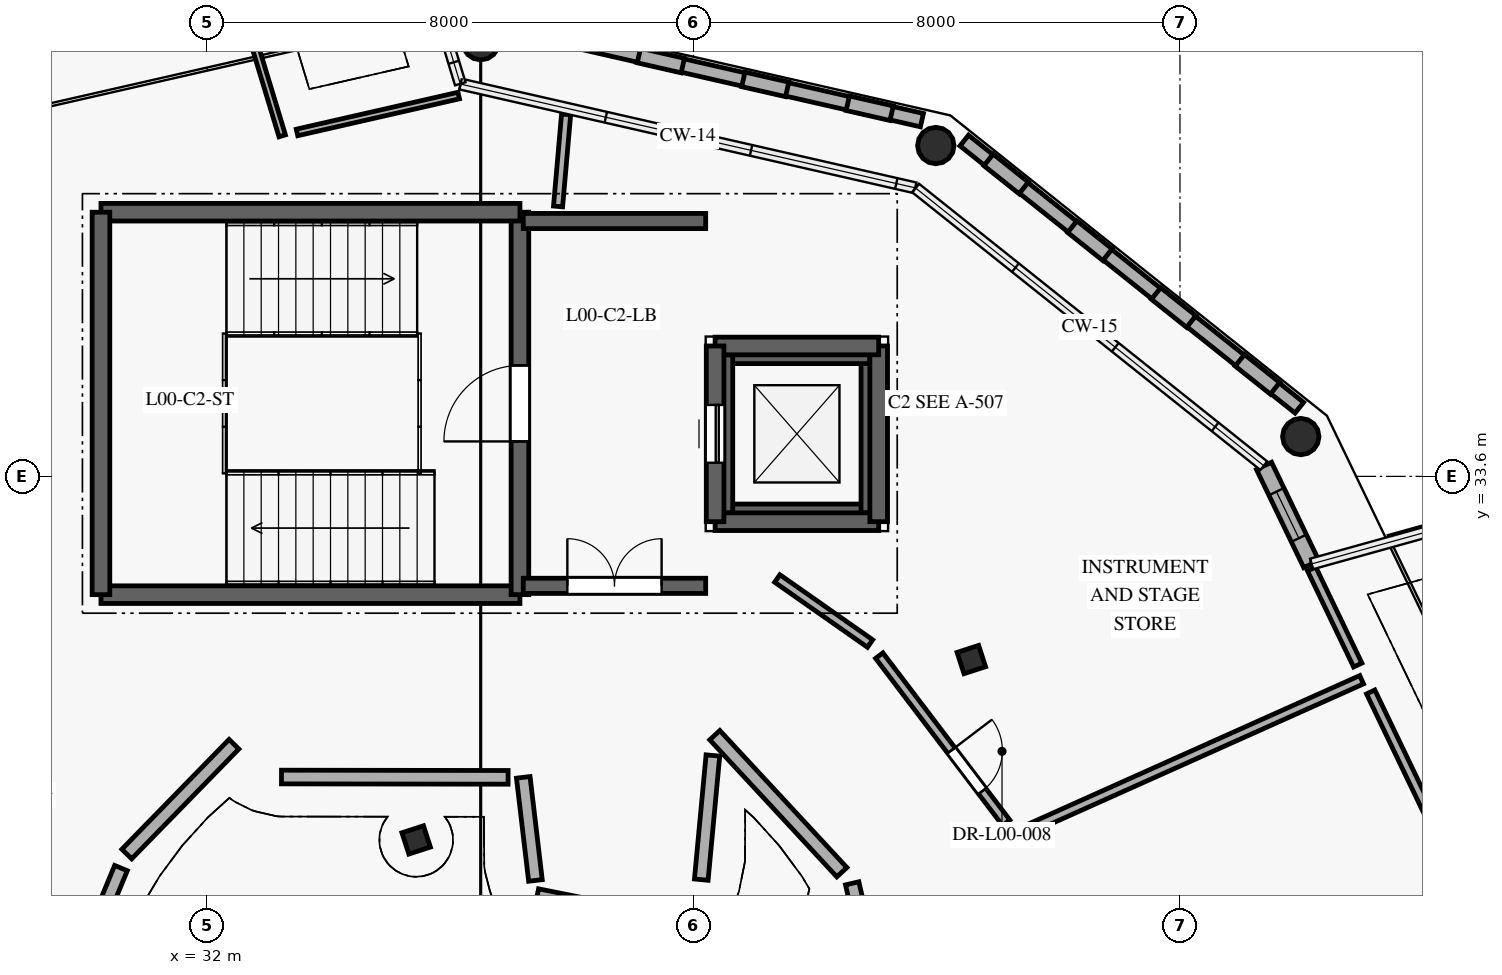
"""IFC4 building model, lengths in metres.
Left out: names, types, materials, properties, quantities, classifications, styles, units other than length and angle.
Written with IfcOpenShell. Run it as: python <this file> out.ifc"""

import sys

from ifc_helpers import new_model, si_unit, direction, frame, frame_2d, origin, origin_2d, place, context, subcontext, project, spatial, rectangle, circle, i_section, extrude, element, fill, save


model = new_model("IFC4")
c1 = context("Model", 3, precision=1e-05, world=origin(), true_north=direction((0.0, 1.0)))
c2 = subcontext(c1, "Body", "Model", "MODEL_VIEW")
j1 = project(units=[si_unit("LENGTHUNIT", "METRE"), si_unit("PLANEANGLEUNIT", "RADIAN")], contexts=[c1])
p1 = place(None, origin())
s1 = spatial("IfcSite", under=j1, at=p1, CompositionType="ELEMENT")
p2 = place(p1, origin())
s2 = spatial("IfcBuilding", under=s1, at=p2, CompositionType="ELEMENT")
p3 = place(p2, origin())
s3 = spatial("IfcBuildingStorey", under=s2, at=p3, CompositionType="ELEMENT", Elevation=0.0)
for number, where, z_axis, x_axis in (
    (1, (35.439, 27.621, 0.0), (0.0, 0.0, 1.0), (0.951, 0.309, 0.0)),
    (2, (44.569, 30.588, 0.0), (0.0, 0.0, 1.0), (0.951, 0.309, 0.0)),
):
    element("IfcColumn", number, at=place(p3, frame(where, z_axis=z_axis, x_axis=x_axis)), inside=s3, PredefinedType="COLUMN", context=c2, shape_type="SweptSolid", body=[
        extrude(i_section(OverallWidth=0.373, OverallDepth=0.368, WebThickness=0.014, FlangeThickness=0.024, FilletRadius=0.015, at=origin_2d()), origin(), (0.0, 0.0, 1.0), 4.2),
    ])
for number, where, z_axis, x_axis in (
    (3, (49.987, 34.255, 0.0), (0.0, 0.0, 1.0), (-0.623, 0.782, 0.0)),
    (4, (43.985, 39.042, 0.0), (0.0, 0.0, 1.0), (-0.901, 0.434, 0.0)),
    (5, (36.5, 40.75, 0.0), (0.0, 0.0, 1.0), (-1.0, 0.0, 0.0)),
):
    element("IfcColumn", number, at=place(p3, frame(where, z_axis=z_axis, x_axis=x_axis)), inside=s3, PredefinedType="COLUMN", context=c2, shape_type="SweptSolid", body=[
        extrude(circle(Radius=0.3, at=origin_2d()), origin(), (0.0, 0.0, 1.0), 4.2),
    ])
p4 = place(p3, frame((49.382, 33.773, 0.0), z_axis=(0.0, 0.0, 1.0), x_axis=(0.433922119058, -0.90095038409, 0.0)))
e6 = element("IfcWall", 6, at=p4, inside=s3, PredefinedType="SOLIDWALL", context=c2, shape_type="SweptSolid", body=[
    extrude(rectangle(XDim=1.792, YDim=0.275, at=frame_2d((0.896, 0.0))), origin(), (0.0, 0.0, 1.0), 3.94),
])
p5 = place(p4, frame((0.471, 0.0, 0.85)))
e7 = element("IfcOpeningElement", 7, at=p5, cuts=e6, PredefinedType="OPENING", context=c2, shape_type="SweptSolid", body=[
    extrude(rectangle(XDim=0.85, YDim=1.4, at=frame_2d((0.425, 0.7))), frame((0.0, 0.147, 0.0), z_axis=(0.0, -1.0, 0.0), x_axis=(1.0, 0.0, 0.0)), (0.0, 0.0, 1.0), 0.295),
])
p6 = place(p3, frame((49.963, 34.73, 0.0), z_axis=(0.0, 0.0, 1.0), x_axis=(-0.781827630302, 0.623494632291, 0.0)))
e8 = element("IfcWall", 8, at=p6, inside=s3, PredefinedType="ELEMENTEDWALL", context=c2, shape_type="SweptSolid", body=[
    extrude(rectangle(XDim=7.048, YDim=0.225, at=frame_2d((3.524, 0.0))), origin(), (0.0, 0.0, 1.0), 0.55),
])
for number, where, z_axis, x_axis in (
    (9, (49.563, 35.048, 0.55), (0.0, 0.0, 1.0), (-0.782, 0.623, 0.0)),
    (10, (48.186, 36.147, 0.55), (0.0, 0.0, 1.0), (-0.782, 0.623, 0.0)),
    (11, (46.808, 37.246, 0.55), (0.0, 0.0, 1.0), (-0.782, 0.623, 0.0)),
    (12, (45.431, 38.344, 0.55), (0.0, 0.0, 1.0), (-0.782, 0.623, 0.0)),
):
    element("IfcWall", number, at=place(p3, frame(where, z_axis=z_axis, x_axis=x_axis)), inside=s3, PredefinedType="ELEMENTEDWALL", context=c2, shape_type="SweptSolid", body=[
        extrude(rectangle(XDim=0.74, YDim=0.245, at=frame_2d((0.37, 0.0))), origin(), (0.0, 0.0, 1.0), 3.39),
    ])
p7 = place(p3, frame((43.756, 39.459, 0.0), z_axis=(0.0, 0.0, 1.0), x_axis=(-0.974930278984, 0.222510564064, 0.0)))
e13 = element("IfcWall", 13, at=p7, inside=s3, PredefinedType="ELEMENTEDWALL", context=c2, shape_type="SweptSolid", body=[
    extrude(rectangle(XDim=7.046, YDim=0.225, at=frame_2d((3.523, 0.0))), origin(), (0.0, 0.0, 1.0), 0.55),
])
p8 = place(p3, frame((43.258, 39.573, 0.55), z_axis=(0.0, 0.0, 1.0), x_axis=(-0.974960788757, 0.222376843189, 0.0)))
e14 = element("IfcWall", 14, at=p8, inside=s3, PredefinedType="ELEMENTEDWALL", context=c2, shape_type="SweptSolid", body=[
    extrude(rectangle(XDim=0.74, YDim=0.245, at=frame_2d((0.37, 0.0))), origin(), (0.0, 0.0, 1.0), 3.39),
])
p9 = place(p3, frame((41.541, 39.965, 0.55), z_axis=(0.0, 0.0, 1.0), x_axis=(-0.974977096703, 0.222305332604, 0.0)))
e15 = element("IfcWall", 15, at=p9, inside=s3, PredefinedType="ELEMENTEDWALL", context=c2, shape_type="SweptSolid", body=[
    extrude(rectangle(XDim=0.74, YDim=0.245, at=frame_2d((0.37, 0.0))), origin(), (0.0, 0.0, 1.0), 3.39),
])
p10 = place(p3, frame((39.823, 40.357, 0.55), z_axis=(0.0, 0.0, 1.0), x_axis=(-0.974960788757, 0.222376843189, 0.0)))
e16 = element("IfcWall", 16, at=p10, inside=s3, PredefinedType="ELEMENTEDWALL", context=c2, shape_type="SweptSolid", body=[
    extrude(rectangle(XDim=0.74, YDim=0.245, at=frame_2d((0.37, 0.0))), origin(), (0.0, 0.0, 1.0), 3.39),
])
p11 = place(p3, frame((40.5, 33.0, -1.4), z_axis=(0.0, 0.0, 1.0), x_axis=(1.0, 0.0, 0.0)))
e17 = element("IfcWall", 17, at=p11, inside=s3, PredefinedType="SHEAR", context=c2, shape_type="SweptSolid", body=[
    extrude(rectangle(XDim=2.4, YDim=0.29, at=frame_2d((1.2, 0.0))), origin(), (0.0, 0.0, 1.0), 1.4),
])
p12 = place(p3, frame((42.9, 33.0, -1.4), z_axis=(0.0, 0.0, 1.0), x_axis=(0.0, 1.0, 0.0)))
e18 = element("IfcWall", 18, at=p12, inside=s3, PredefinedType="SHEAR", context=c2, shape_type="SweptSolid", body=[
    extrude(rectangle(XDim=2.6, YDim=0.29, at=frame_2d((1.3, 0.0))), origin(), (0.0, 0.0, 1.0), 1.4),
])
p13 = place(p3, frame((42.9, 35.6, -1.4), z_axis=(0.0, 0.0, 1.0), x_axis=(-1.0, 0.0, 0.0)))
e19 = element("IfcWall", 19, at=p13, inside=s3, PredefinedType="SHEAR", context=c2, shape_type="SweptSolid", body=[
    extrude(rectangle(XDim=2.4, YDim=0.29, at=frame_2d((1.2, 0.0))), origin(), (0.0, 0.0, 1.0), 1.4),
])
p14 = place(p3, frame((40.5, 35.6, -1.4), z_axis=(0.0, 0.0, 1.0), x_axis=(0.0, -1.0, 0.0)))
e20 = element("IfcWall", 20, at=p14, inside=s3, PredefinedType="SHEAR", context=c2, shape_type="SweptSolid", body=[
    extrude(rectangle(XDim=2.6, YDim=0.29, at=frame_2d((1.3, 0.0))), origin(), (0.0, 0.0, 1.0), 1.4),
])
p15 = place(p3, frame((30.255, 31.655, 0.0), z_axis=(0.0, 0.0, 1.0), x_axis=(1.0, 0.0, 0.0)))
e21 = element("IfcWall", 21, at=p15, inside=s3, PredefinedType="SHEAR", context=c2, shape_type="SweptSolid", body=[
    extrude(rectangle(XDim=6.89, YDim=0.29, at=frame_2d((3.445, 0.0))), origin(), (0.0, 0.0, 1.0), 3.95),
])
p16 = place(p3, frame((37.145, 31.655, 0.0), z_axis=(0.0, 0.0, 1.0), x_axis=(0.0, 1.0, 0.0)))
e22 = element("IfcWall", 22, at=p16, inside=s3, PredefinedType="SHEAR", context=c2, shape_type="SweptSolid", body=[
    extrude(rectangle(XDim=6.29, YDim=0.29, at=frame_2d((3.145, 0.0))), origin(), (0.0, 0.0, 1.0), 3.95),
])
p17 = place(p16, frame((2.52, 0.0, 0.0)))
e23 = element("IfcOpeningElement", 23, at=p17, cuts=e22, PredefinedType="OPENING", context=c2, shape_type="SweptSolid", body=[
    extrude(rectangle(XDim=1.25, YDim=2.1, at=frame_2d((0.625, 1.05))), frame((0.0, 0.155, 0.0), z_axis=(0.0, -1.0, 0.0), x_axis=(1.0, 0.0, 0.0)), (0.0, 0.0, 1.0), 0.31),
])
p18 = place(p3, frame((37.145, 37.945, 0.0), z_axis=(0.0, 0.0, 1.0), x_axis=(-1.0, 0.0, 0.0)))
e24 = element("IfcWall", 24, at=p18, inside=s3, PredefinedType="SHEAR", context=c2, shape_type="SweptSolid", body=[
    extrude(rectangle(XDim=6.89, YDim=0.29, at=frame_2d((3.445, 0.0))), origin(), (0.0, 0.0, 1.0), 3.95),
])
p19 = place(p3, frame((30.255, 37.945, 0.0), z_axis=(0.0, 0.0, 1.0), x_axis=(0.0, -1.0, 0.0)))
e25 = element("IfcWall", 25, at=p19, inside=s3, PredefinedType="SHEAR", context=c2, shape_type="SweptSolid", body=[
    extrude(rectangle(XDim=6.29, YDim=0.29, at=frame_2d((3.145, 0.0))), origin(), (0.0, 0.0, 1.0), 3.95),
])
p20 = place(p3, frame((40.355, 32.855, 0.0), z_axis=(0.0, 0.0, 1.0), x_axis=(1.0, 0.0, 0.0)))
e26 = element("IfcWall", 26, at=p20, inside=s3, PredefinedType="SHEAR", context=c2, shape_type="SweptSolid", body=[
    extrude(rectangle(XDim=2.69, YDim=0.29, at=frame_2d((1.345, 0.0))), origin(), (0.0, 0.0, 1.0), 3.95),
])
p21 = place(p3, frame((43.045, 32.855, 0.0), z_axis=(0.0, 0.0, 1.0), x_axis=(0.0, 1.0, 0.0)))
e27 = element("IfcWall", 27, at=p21, inside=s3, PredefinedType="SHEAR", context=c2, shape_type="SweptSolid", body=[
    extrude(rectangle(XDim=2.89, YDim=0.29, at=frame_2d((1.445, 0.0))), origin(), (0.0, 0.0, 1.0), 3.95),
])
p22 = place(p3, frame((43.045, 35.745, 0.0), z_axis=(0.0, 0.0, 1.0), x_axis=(-1.0, 0.0, 0.0)))
e28 = element("IfcWall", 28, at=p22, inside=s3, PredefinedType="SHEAR", context=c2, shape_type="SweptSolid", body=[
    extrude(rectangle(XDim=2.69, YDim=0.29, at=frame_2d((1.345, 0.0))), origin(), (0.0, 0.0, 1.0), 3.95),
])
p23 = place(p3, frame((40.355, 35.745, 0.0), z_axis=(0.0, 0.0, 1.0), x_axis=(0.0, -1.0, 0.0)))
e29 = element("IfcWall", 29, at=p23, inside=s3, PredefinedType="SHEAR", context=c2, shape_type="SweptSolid", body=[
    extrude(rectangle(XDim=2.89, YDim=0.29, at=frame_2d((1.445, 0.0))), origin(), (0.0, 0.0, 1.0), 3.95),
])
p24 = place(p23, frame((0.97, 0.0, 0.0)))
e30 = element("IfcOpeningElement", 30, at=p24, cuts=e29, PredefinedType="OPENING", context=c2, shape_type="SweptSolid", body=[
    extrude(rectangle(XDim=0.95, YDim=2.1, at=frame_2d((0.475, 1.05))), frame((0.0, 0.155, 0.0), z_axis=(0.0, -1.0, 0.0), x_axis=(1.0, 0.0, 0.0)), (0.0, 0.0, 1.0), 0.31),
])
p25 = place(p3, frame((37.2, 31.8, 0.0), z_axis=(0.0, 0.0, 1.0), x_axis=(1.0, 0.0, 0.0)))
e31 = element("IfcWall", 31, at=p25, inside=s3, PredefinedType="SHEAR", context=c2, shape_type="SweptSolid", body=[
    extrude(rectangle(XDim=3.0, YDim=0.25, at=frame_2d((1.5, 0.0))), origin(), (0.0, 0.0, 1.0), 3.95),
])
p26 = place(p25, frame((0.725, 0.0, 0.0)))
e32 = element("IfcOpeningElement", 32, at=p26, cuts=e31, PredefinedType="OPENING", context=c2, shape_type="SweptSolid", body=[
    extrude(rectangle(XDim=1.55, YDim=2.15, at=frame_2d((0.775, 1.075))), frame((0.0, 0.135, 0.0), z_axis=(0.0, -1.0, 0.0), x_axis=(1.0, 0.0, 0.0)), (0.0, 0.0, 1.0), 0.27),
])
p27 = place(p3, frame((40.2, 37.8, 0.0), z_axis=(0.0, 0.0, 1.0), x_axis=(-1.0, 0.0, 0.0)))
e33 = element("IfcWall", 33, at=p27, inside=s3, PredefinedType="SHEAR", context=c2, shape_type="SweptSolid", body=[
    extrude(rectangle(XDim=3.0, YDim=0.25, at=frame_2d((1.5, 0.0))), origin(), (0.0, 0.0, 1.0), 3.95),
])
p28 = place(p3, frame((45.293, 27.705, 0.0), z_axis=(0.0, 0.0, 1.0), x_axis=(0.912598949967, 0.408855911684, 0.0)))
e34 = element("IfcWall", 34, at=p28, inside=s3, PredefinedType="PARTITIONING", context=c2, shape_type="SweptSolid", body=[
    extrude(rectangle(XDim=6.24, YDim=0.15, at=frame_2d((3.12, 0.0))), origin(), (0.0, 0.0, 1.0), 3.93),
])
p29 = place(p3, frame((37.905, 39.554, 0.0), z_axis=(0.0, 0.0, 1.0), x_axis=(-0.087087221657, -0.996200690536, 0.0)))
e35 = element("IfcWall", 35, at=p29, inside=s3, PredefinedType="PARTITIONING", context=c2, shape_type="SweptSolid", body=[
    extrude(rectangle(XDim=1.52, YDim=0.15, at=frame_2d((0.76, 0.0))), origin(), (0.0, 0.0, 1.0), 3.93),
])
p30 = place(p3, frame((41.377, 31.921, 0.0), z_axis=(0.0, 0.0, 1.0), x_axis=(0.818868770582, -0.573980780659, 0.0)))
e36 = element("IfcWall", 36, at=p30, inside=s3, PredefinedType="PARTITIONING", context=c2, shape_type="SweptSolid", body=[
    extrude(rectangle(XDim=1.864, YDim=0.15, at=frame_2d((0.932, 0.0))), origin(), (0.0, 0.0, 1.0), 3.93),
])
p31 = place(p3, frame((43.055, 30.652, 0.0), z_axis=(0.0, 0.0, 1.0), x_axis=(0.60485547015, -0.796335268734, 0.0)))
e37 = element("IfcWall", 37, at=p31, inside=s3, PredefinedType="PARTITIONING", context=c2, shape_type="SweptSolid", body=[
    extrude(rectangle(XDim=3.451, YDim=0.15, at=frame_2d((1.726, 0.0))), origin(), (0.0, 0.0, 1.0), 3.93),
])
p32 = place(p31, frame((1.958, 0.0, 0.0)))
e38 = element("IfcOpeningElement", 38, at=p32, cuts=e37, PredefinedType="OPENING", context=c2, shape_type="SweptSolid", body=[
    extrude(rectangle(XDim=0.84, YDim=2.04, at=frame_2d((0.42, 1.02))), frame((0.0, 0.085, 0.0), z_axis=(0.0, -1.0, 0.0), x_axis=(1.0, 0.0, 0.0)), (0.0, 0.0, 1.0), 0.17),
])
p33 = place(p3, frame((43.426, 23.37, 0.0), z_axis=(0.0, 0.0, 1.0), x_axis=(-0.224928280914, 0.974375322165, 0.0)))
e39 = element("IfcWall", 39, at=p33, inside=s3, PredefinedType="PARTITIONING", context=c2, shape_type="SweptSolid", body=[
    extrude(rectangle(XDim=3.63, YDim=0.225, at=frame_2d((1.815, 0.0))), origin(), (0.0, 0.0, 1.0), 3.93),
])
p34 = place(p3, frame((42.439, 27.09, 0.0), z_axis=(0.0, 0.0, 1.0), x_axis=(-0.679868886852, 0.733333687138, 0.0)))
e40 = element("IfcWall", 40, at=p34, inside=s3, PredefinedType="PARTITIONING", context=c2, shape_type="SweptSolid", body=[
    extrude(rectangle(XDim=3.073, YDim=0.225, at=frame_2d((1.537, 0.0))), origin(), (0.0, 0.0, 1.0), 3.93),
])
p35 = place(p3, frame((40.319, 29.01, 0.0), z_axis=(0.0, 0.0, 1.0), x_axis=(-0.093337020721, -0.9956345718, 0.0)))
e41 = element("IfcWall", 41, at=p35, inside=s3, PredefinedType="PARTITIONING", context=c2, shape_type="SweptSolid", body=[
    extrude(rectangle(XDim=2.051, YDim=0.225, at=frame_2d((1.025, 0.0))), origin(), (0.0, 0.0, 1.0), 3.93),
])
p36 = place(p3, frame((39.21, 26.35, 0.0), z_axis=(0.0, 0.0, 1.0), x_axis=(-0.98057033174, 0.196167847801, 0.0)))
e42 = element("IfcWall", 42, at=p36, inside=s3, PredefinedType="PARTITIONING", context=c2, shape_type="SweptSolid", body=[
    extrude(rectangle(XDim=1.816, YDim=0.225, at=frame_2d((0.908, 0.0))), origin(), (0.0, 0.0, 1.0), 3.93),
])
p37 = place(p3, frame((37.4, 26.955, 0.0), z_axis=(0.0, 0.0, 1.0), x_axis=(-0.117272723628, 0.993099747404, 0.0)))
e43 = element("IfcWall", 43, at=p37, inside=s3, PredefinedType="PARTITIONING", context=c2, shape_type="SweptSolid", body=[
    extrude(rectangle(XDim=1.707, YDim=0.225, at=frame_2d((0.854, 0.0))), origin(), (0.0, 0.0, 1.0), 3.93),
])
p38 = place(p3, frame((36.95, 28.65, 0.0), z_axis=(0.0, 0.0, 1.0), x_axis=(-0.999999053484, 0.001375875, 0.0)))
e44 = element("IfcWall", 44, at=p38, inside=s3, PredefinedType="PARTITIONING", context=c2, shape_type="SweptSolid", body=[
    extrude(rectangle(XDim=3.726, YDim=0.225, at=frame_2d((1.863, 0.0))), origin(), (0.0, 0.0, 1.0), 3.93),
])
p39 = place(p3, frame((32.442, 29.195, 0.0), z_axis=(0.0, 0.0, 1.0), x_axis=(-0.698395175587, -0.715712357527, 0.0)))
e45 = element("IfcWall", 45, at=p39, inside=s3, PredefinedType="PARTITIONING", context=c2, shape_type="SweptSolid", body=[
    extrude(rectangle(XDim=2.524, YDim=0.225, at=frame_2d((1.262, 0.0))), origin(), (0.0, 0.0, 1.0), 3.93),
])
p40 = place(p3, frame((30.584, 27.158, 0.0), z_axis=(0.0, 0.0, 1.0), x_axis=(-0.382609569979, -0.923910123854, 0.0)))
e46 = element("IfcWall", 46, at=p40, inside=s3, PredefinedType="PARTITIONING", context=c2, shape_type="SweptSolid", body=[
    extrude(rectangle(XDim=2.481, YDim=0.225, at=frame_2d((1.241, 0.0))), origin(), (0.0, 0.0, 1.0), 3.93),
])
p41 = place(p3, frame((50.166, 32.077, 0.0), z_axis=(0.0, 0.0, 1.0), x_axis=(0.43261333435, -0.901579559963, 0.0)))
e47 = element("IfcWall", 47, at=p41, inside=s3, PredefinedType="PARTITIONING", context=c2, shape_type="SweptSolid", body=[
    extrude(rectangle(XDim=1.753, YDim=0.15, at=frame_2d((0.876, 0.0))), origin(), (0.0, 0.0, 1.0), 3.93),
])
p42 = place(p3, frame((51.136, 30.055, 0.0), z_axis=(0.0, 0.0, 1.0), x_axis=(0.432669492515, -0.901552610914, 0.0)))
e48 = element("IfcWall", 48, at=p42, inside=s3, PredefinedType="PARTITIONING", context=c2, shape_type="SweptSolid", body=[
    extrude(rectangle(XDim=3.222, YDim=0.15, at=frame_2d((1.611, 0.0))), origin(), (0.0, 0.0, 1.0), 3.93),
])
p43 = place(p3, frame((21.363, 78.368, 0.0), z_axis=(0.0, 0.0, 1.0), x_axis=(0.290095143461, -0.956997809684, 0.0)))
e49 = element("IfcWall", 49, at=p43, inside=s3, PredefinedType="PARTITIONING", context=c2, shape_type="SweptSolid", body=[
    extrude(rectangle(XDim=40.927, YDim=0.11, at=frame_2d((20.463, 0.0))), origin(), (0.0, 0.0, 1.0), 3.915),
])
p44 = place(p43, frame((19.943, 0.0, 0.0)))
e50 = element("IfcOpeningElement", 50, at=p44, cuts=e49, PredefinedType="OPENING", context=c2, shape_type="SweptSolid", body=[
    extrude(rectangle(XDim=1.04, YDim=2.1, at=frame_2d((0.52, 1.05))), frame((0.0, 0.065, 0.0), z_axis=(0.0, -1.0, 0.0), x_axis=(1.0, 0.0, 0.0)), (0.0, 0.0, 1.0), 0.13),
])
p45 = place(p3, frame((33.479, 39.257, 0.0), z_axis=(0.0, 0.0, 1.0), x_axis=(0.974917901323, 0.222564789847, 0.0)))
e51 = element("IfcWall", 51, at=p45, inside=s3, PredefinedType="PARTITIONING", context=c2, shape_type="SweptSolid", body=[
    extrude(rectangle(XDim=2.728, YDim=0.11, at=frame_2d((1.364, 0.0))), origin(), (0.0, 0.0, 1.0), 3.915),
])
p46 = place(p5, origin())
e52 = element("IfcWindow", 52, at=p46, inside=s3, PartitioningType="SINGLE_PANEL", PredefinedType="WINDOW", context=c2, shape_type="SweptSolid", body=[
    extrude(rectangle(XDim=0.85, YDim=1.4, at=frame_2d((0.425, 0.7))), frame((0.0, 0.03, 0.0), z_axis=(0.0, -1.0, 0.0), x_axis=(1.0, 0.0, 0.0)), (0.0, 0.0, 1.0), 0.06),
])
fill(e7, e52)
p47 = place(p17, frame((1.25, 0.0, 0.0), z_axis=(0.0, 0.0, 1.0), x_axis=(-1.0, 0.0, 0.0)))
e53 = element("IfcDoor", 53, at=p47, inside=s3, OperationType="SINGLE_SWING_LEFT", PredefinedType="DOOR", context=c2, shape_type="SweptSolid", body=[
    extrude(rectangle(XDim=1.25, YDim=2.1, at=frame_2d((0.625, 1.05))), frame((0.0, 0.025, 0.0), z_axis=(0.0, -1.0, 0.0), x_axis=(1.0, 0.0, 0.0)), (0.0, 0.0, 1.0), 0.05),
])
fill(e23, e53)
p48 = place(p24, frame((0.95, 0.0, 0.0), z_axis=(0.0, 0.0, 1.0), x_axis=(-1.0, 0.0, 0.0)))
e54 = element("IfcDoor", 54, at=p48, inside=s3, OperationType="SLIDING_TO_LEFT", PredefinedType="DOOR", context=c2, shape_type="SweptSolid", body=[
    extrude(rectangle(XDim=0.95, YDim=2.1, at=frame_2d((0.475, 1.05))), frame((0.0, 0.025, 0.0), z_axis=(0.0, -1.0, 0.0), x_axis=(1.0, 0.0, 0.0)), (0.0, 0.0, 1.0), 0.05),
])
fill(e30, e54)
p49 = place(p26, frame((1.55, 0.0, 0.0), z_axis=(0.0, 0.0, 1.0), x_axis=(-1.0, 0.0, 0.0)))
e55 = element("IfcDoor", 55, at=p49, inside=s3, OperationType="DOUBLE_DOOR_SINGLE_SWING", PredefinedType="DOOR", context=c2, shape_type="SweptSolid", body=[
    extrude(rectangle(XDim=1.55, YDim=2.15, at=frame_2d((0.775, 1.075))), frame((0.0, 0.025, 0.0), z_axis=(0.0, -1.0, 0.0), x_axis=(1.0, 0.0, 0.0)), (0.0, 0.0, 1.0), 0.05),
])
fill(e32, e55)
p50 = place(p32, origin())
e56 = element("IfcDoor", 56, at=p50, inside=s3, OperationType="SINGLE_SWING_LEFT", PredefinedType="DOOR", context=c2, shape_type="SweptSolid", body=[
    extrude(rectangle(XDim=0.84, YDim=2.04, at=frame_2d((0.42, 1.02))), frame((0.0, 0.025, 0.0), z_axis=(0.0, -1.0, 0.0), x_axis=(1.0, 0.0, 0.0)), (0.0, 0.0, 1.0), 0.05),
])
fill(e38, e56)
save(model, sys.argv[1])
